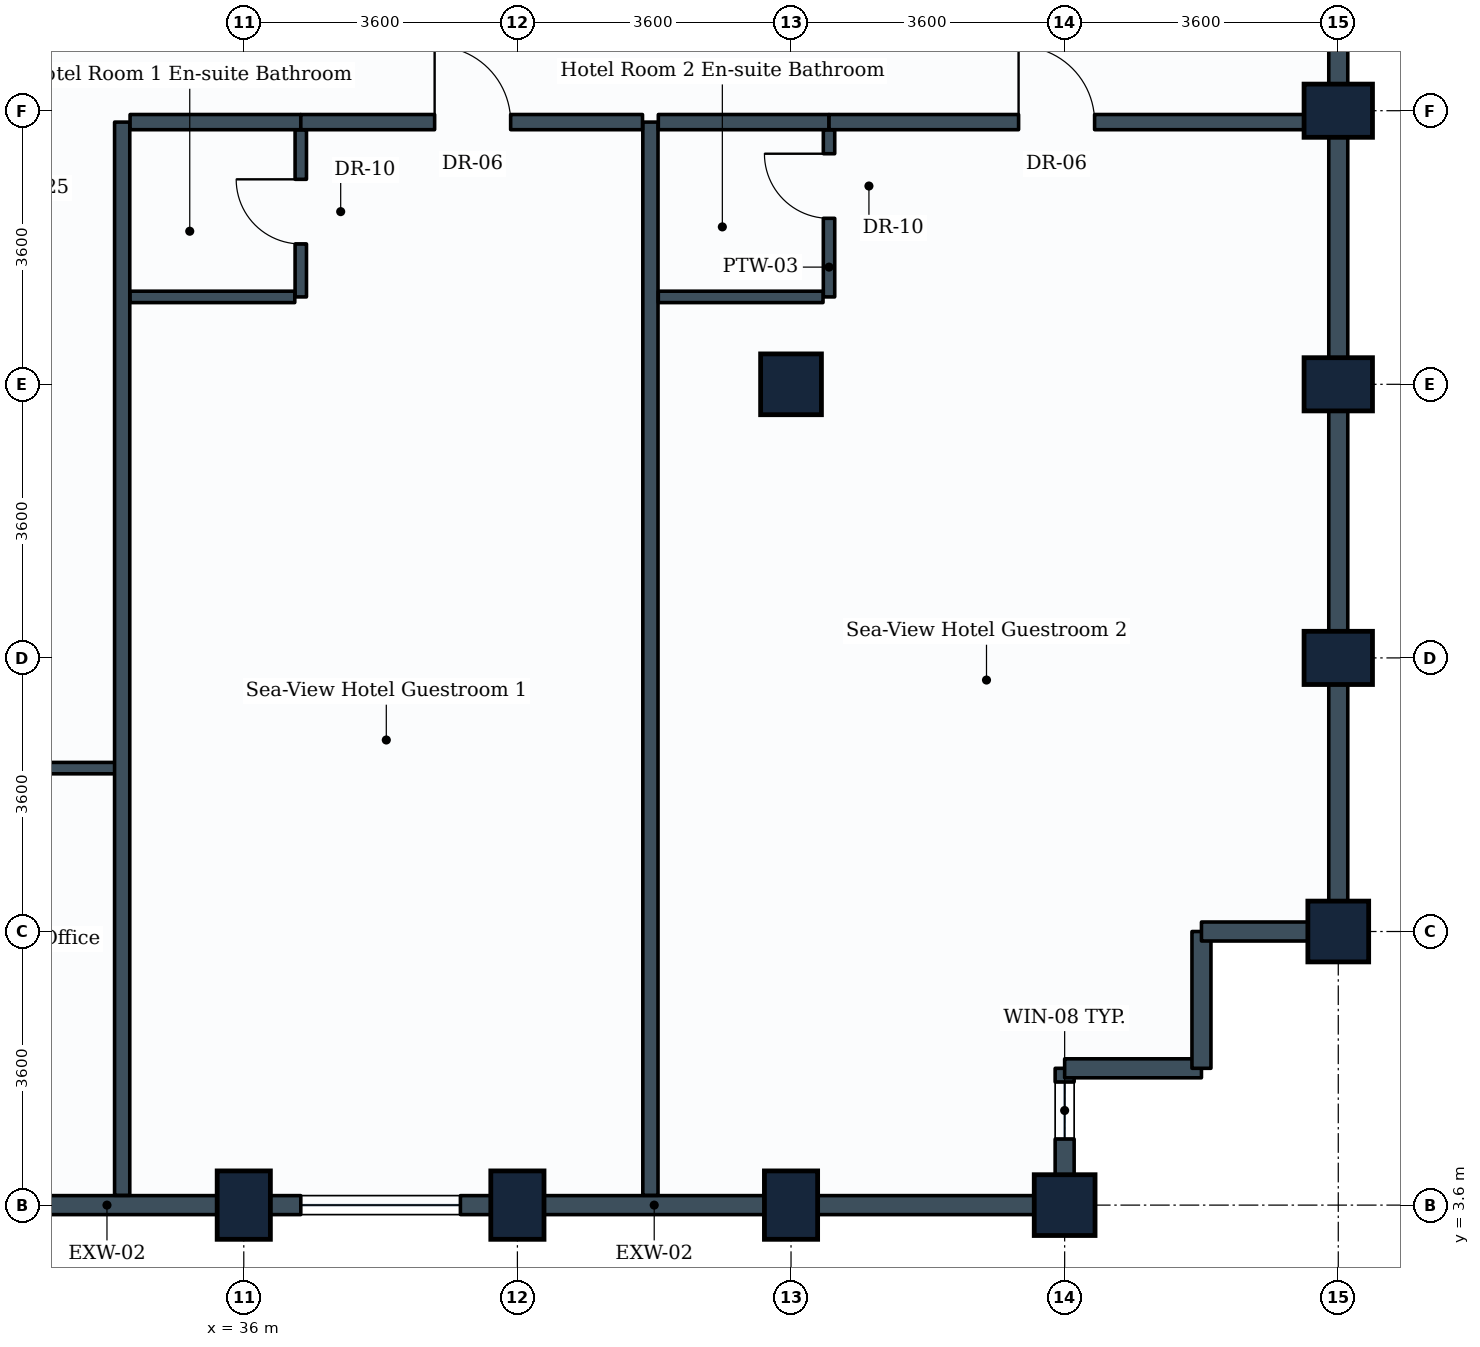
"""IFC4 building model, lengths in metres.
Left out: names, types, materials, properties, quantities, classifications, styles, units other than length and angle.
Written with IfcOpenShell. Run it as: python <this file> out.ifc"""

import sys

from ifc_helpers import new_model, si_unit, direction, frame, frame_2d, origin, origin_2d, place, context, subcontext, project, spatial, rectangle, extrude, element, fill, save


model = new_model("IFC4")
c1 = context("Model", 3, precision=1e-05, world=origin(), true_north=direction((0.0, 1.0)))
c2 = subcontext(c1, "Body", "Model", "MODEL_VIEW")
j1 = project(units=[si_unit("LENGTHUNIT", "METRE"), si_unit("PLANEANGLEUNIT", "RADIAN")], contexts=[c1])
p1 = place(None, origin())
s1 = spatial("IfcSite", under=j1, at=p1, CompositionType="ELEMENT")
p2 = place(p1, origin())
s2 = spatial("IfcBuilding", under=s1, at=p2, CompositionType="ELEMENT")
p3 = place(p2, frame((0.0, 0.0, 217.4)))
s3 = spatial("IfcBuildingStorey", under=s2, at=p3, CompositionType="ELEMENT", Elevation=217.4)
for number, where, z_axis, x_axis in (
    (1, (36.0, 3.6, 0.0), (0.0, 0.0, 1.0), (1.0, 0.0, 0.0)),
    (2, (39.6, 3.6, 0.0), (0.0, 0.0, 1.0), (1.0, 0.0, 0.0)),
    (3, (43.2, 3.6, 0.0), (0.0, 0.0, 1.0), (1.0, 0.0, 0.0)),
):
    element("IfcColumn", number, at=place(p3, frame(where, z_axis=z_axis, x_axis=x_axis)), inside=s3, PredefinedType="COLUMN", context=c2, shape_type="SweptSolid", body=[
        extrude(rectangle(XDim=0.7, YDim=0.9, at=origin_2d()), origin(), (0.0, 0.0, 1.0), 3.6),
    ])
for number, where, z_axis, x_axis in (
    (4, (43.2, 14.4, 0.0), (0.0, 0.0, 1.0), (1.0, 0.0, 0.0)),
    (5, (46.8, 3.6, 0.0), (0.0, 0.0, 1.0), (1.0, 0.0, 0.0)),
    (6, (50.4, 7.2, 0.0), (0.0, 0.0, 1.0), (1.0, 0.0, 0.0)),
):
    element("IfcColumn", number, at=place(p3, frame(where, z_axis=z_axis, x_axis=x_axis)), inside=s3, PredefinedType="COLUMN", context=c2, shape_type="SweptSolid", body=[
        extrude(rectangle(XDim=0.8, YDim=0.8, at=origin_2d()), origin(), (0.0, 0.0, 1.0), 3.6),
    ])
for number, where, z_axis, x_axis in (
    (7, (50.4, 10.8, 0.0), (0.0, 0.0, 1.0), (0.0, 1.0, 0.0)),
    (8, (50.4, 14.4, 0.0), (0.0, 0.0, 1.0), (0.0, 1.0, 0.0)),
    (9, (50.4, 18.0, 0.0), (0.0, 0.0, 1.0), (0.0, 1.0, 0.0)),
):
    element("IfcColumn", number, at=place(p3, frame(where, z_axis=z_axis, x_axis=x_axis)), inside=s3, PredefinedType="COLUMN", context=c2, shape_type="SweptSolid", body=[
        extrude(rectangle(XDim=0.7, YDim=0.9, at=origin_2d()), origin(), (0.0, 0.0, 1.0), 3.6),
    ])
p4 = place(p3, frame((36.0, 3.6, 0.0), z_axis=(0.0, 0.0, 1.0), x_axis=(-1.0, 0.0, 0.0)))
e10 = element("IfcWall", 10, at=p4, inside=s3, PredefinedType="STANDARD", context=c2, shape_type="SweptSolid", body=[
    extrude(rectangle(XDim=3.6, YDim=0.25, at=frame_2d((1.8, 0.0))), origin(), (0.0, 0.0, 1.0), 2.83),
])
p5 = place(p3, frame((39.6, 3.6, 0.0), z_axis=(0.0, 0.0, 1.0), x_axis=(-1.0, 0.0, 0.0)))
e11 = element("IfcWall", 11, at=p5, inside=s3, PredefinedType="STANDARD", context=c2, shape_type="SweptSolid", body=[
    extrude(rectangle(XDim=3.6, YDim=0.25, at=frame_2d((1.8, 0.0))), origin(), (0.0, 0.0, 1.0), 2.83),
])
p6 = place(p5, frame((0.75, 0.0, 0.85)))
e12 = element("IfcOpeningElement", 12, at=p6, cuts=e11, PredefinedType="OPENING", context=c2, shape_type="SweptSolid", body=[
    extrude(rectangle(XDim=2.1, YDim=1.35, at=frame_2d((1.05, 0.675))), frame((0.0, 0.135, 0.0), z_axis=(0.0, -1.0, 0.0), x_axis=(1.0, 0.0, 0.0)), (0.0, 0.0, 1.0), 0.27),
])
p7 = place(p3, frame((43.2, 3.6, 0.0), z_axis=(0.0, 0.0, 1.0), x_axis=(-1.0, 0.0, 0.0)))
e13 = element("IfcWall", 13, at=p7, inside=s3, PredefinedType="STANDARD", context=c2, shape_type="SweptSolid", body=[
    extrude(rectangle(XDim=3.6, YDim=0.25, at=frame_2d((1.8, 0.0))), origin(), (0.0, 0.0, 1.0), 2.23),
])
p8 = place(p3, frame((46.8, 3.6, 0.0), z_axis=(0.0, 0.0, 1.0), x_axis=(-1.0, 0.0, 0.0)))
e14 = element("IfcWall", 14, at=p8, inside=s3, PredefinedType="STANDARD", context=c2, shape_type="SweptSolid", body=[
    extrude(rectangle(XDim=3.6, YDim=0.25, at=frame_2d((1.8, 0.0))), origin(), (0.0, 0.0, 1.0), 2.23),
])
p9 = place(p3, frame((46.8, 5.4, 0.0), z_axis=(0.0, 0.0, 1.0), x_axis=(0.0, -1.0, 0.0)))
e15 = element("IfcWall", 15, at=p9, inside=s3, PredefinedType="STANDARD", context=c2, shape_type="SweptSolid", body=[
    extrude(rectangle(XDim=1.8, YDim=0.25, at=frame_2d((0.9, 0.0))), origin(), (0.0, 0.0, 1.0), 3.265),
])
p10 = place(p9, frame((0.18, 0.0, 0.85)))
e16 = element("IfcOpeningElement", 16, at=p10, cuts=e15, PredefinedType="OPENING", context=c2, shape_type="SweptSolid", body=[
    extrude(rectangle(XDim=0.75, YDim=1.05, at=frame_2d((0.375, 0.525))), frame((0.0, 0.135, 0.0), z_axis=(0.0, -1.0, 0.0), x_axis=(1.0, 0.0, 0.0)), (0.0, 0.0, 1.0), 0.27),
])
for number, where, z_axis, x_axis in (
    (17, (48.6, 5.4, 0.0), (0.0, 0.0, 1.0), (-1.0, 0.0, 0.0)),
    (18, (48.6, 7.2, 0.0), (0.0, 0.0, 1.0), (0.0, -1.0, 0.0)),
):
    element("IfcWall", number, at=place(p3, frame(where, z_axis=z_axis, x_axis=x_axis)), inside=s3, PredefinedType="STANDARD", context=c2, shape_type="SweptSolid", body=[
        extrude(rectangle(XDim=1.8, YDim=0.25, at=frame_2d((0.9, 0.0))), origin(), (0.0, 0.0, 1.0), 3.265),
    ])
p11 = place(p3, frame((50.4, 7.2, 0.0), z_axis=(0.0, 0.0, 1.0), x_axis=(-1.0, 0.0, 0.0)))
e19 = element("IfcWall", 19, at=p11, inside=s3, PredefinedType="STANDARD", context=c2, shape_type="SweptSolid", body=[
    extrude(rectangle(XDim=1.8, YDim=0.25, at=frame_2d((0.9, 0.0))), origin(), (0.0, 0.0, 1.0), 2.23),
])
p12 = place(p3, frame((50.4, 10.8, 0.0), z_axis=(0.0, 0.0, 1.0), x_axis=(0.0, -1.0, 0.0)))
e20 = element("IfcWall", 20, at=p12, inside=s3, PredefinedType="STANDARD", context=c2, shape_type="SweptSolid", body=[
    extrude(rectangle(XDim=3.6, YDim=0.25, at=frame_2d((1.8, 0.0))), origin(), (0.0, 0.0, 1.0), 2.23),
])
p13 = place(p3, frame((50.4, 14.4, 0.0), z_axis=(0.0, 0.0, 1.0), x_axis=(0.0, -1.0, 0.0)))
e21 = element("IfcWall", 21, at=p13, inside=s3, PredefinedType="STANDARD", context=c2, shape_type="SweptSolid", body=[
    extrude(rectangle(XDim=3.6, YDim=0.25, at=frame_2d((1.8, 0.0))), origin(), (0.0, 0.0, 1.0), 2.23),
])
for number, where, z_axis, x_axis in (
    (22, (50.4, 18.0, 0.0), (0.0, 0.0, 1.0), (0.0, -1.0, 0.0)),
    (23, (50.4, 21.6, 0.0), (0.0, 0.0, 1.0), (0.0, -1.0, 0.0)),
):
    element("IfcWall", number, at=place(p3, frame(where, z_axis=z_axis, x_axis=x_axis)), inside=s3, PredefinedType="STANDARD", context=c2, shape_type="SweptSolid", body=[
        extrude(rectangle(XDim=3.6, YDim=0.25, at=frame_2d((1.8, 0.0))), origin(), (0.0, 0.0, 1.0), 2.23),
    ])
p14 = place(p3, frame((28.879, 9.35, 0.0), z_axis=(0.0, 0.0, 1.0), x_axis=(1.0, 0.0, 0.0)))
e24 = element("IfcWall", 24, at=p14, inside=s3, PredefinedType="PARTITIONING", context=c2, shape_type="SweptSolid", body=[
    extrude(rectangle(XDim=5.521, YDim=0.15, at=frame_2d((2.76, 0.0))), origin(), (0.0, 0.0, 1.0), 3.265),
])
p15 = place(p14, frame((0.36, 0.0, 0.0)))
e25 = element("IfcOpeningElement", 25, at=p15, cuts=e24, PredefinedType="OPENING", context=c2, shape_type="SweptSolid", body=[
    extrude(rectangle(XDim=1.0, YDim=2.1, at=frame_2d((0.5, 1.05))), frame((0.0, 0.085, 0.0), z_axis=(0.0, -1.0, 0.0), x_axis=(1.0, 0.0, 0.0)), (0.0, 0.0, 1.0), 0.17),
])
for number, where, z_axis, x_axis in (
    (26, (34.4, 3.729, 0.0), (0.0, 0.0, 1.0), (0.0, 1.0, 0.0)),
    (27, (41.35, 3.729, 0.0), (0.0, 0.0, 1.0), (0.0, 1.0, 0.0)),
):
    element("IfcWall", number, at=place(p3, frame(where, z_axis=z_axis, x_axis=x_axis)), inside=s3, PredefinedType="PARTITIONING", context=c2, shape_type="SweptSolid", body=[
        extrude(rectangle(XDim=14.121, YDim=0.2, at=frame_2d((7.061, 0.0))), origin(), (0.0, 0.0, 1.0), 2.23),
    ])
p16 = place(p3, frame((34.504, 17.85, 0.0), z_axis=(0.0, 0.0, 1.0), x_axis=(1.0, 0.0, 0.0)))
e28 = element("IfcWall", 28, at=p16, inside=s3, PredefinedType="PARTITIONING", context=c2, shape_type="SweptSolid", body=[
    extrude(rectangle(XDim=2.246, YDim=0.2, at=frame_2d((1.123, 0.0))), origin(), (0.0, 0.0, 1.0), 2.96),
])
p17 = place(p3, frame((36.75, 17.85, 0.0), z_axis=(0.0, 0.0, 1.0), x_axis=(1.0, 0.0, 0.0)))
e29 = element("IfcWall", 29, at=p17, inside=s3, PredefinedType="PARTITIONING", context=c2, shape_type="SweptSolid", body=[
    extrude(rectangle(XDim=4.496, YDim=0.2, at=frame_2d((2.248, 0.0))), origin(), (0.0, 0.0, 1.0), 3.265),
])
p18 = place(p17, frame((1.761, 0.0, 0.0)))
e30 = element("IfcOpeningElement", 30, at=p18, cuts=e29, PredefinedType="OPENING", context=c2, shape_type="SweptSolid", body=[
    extrude(rectangle(XDim=1.0, YDim=2.1, at=frame_2d((0.5, 1.05))), frame((0.0, 0.11, 0.0), z_axis=(0.0, -1.0, 0.0), x_axis=(1.0, 0.0, 0.0)), (0.0, 0.0, 1.0), 0.22),
])
p19 = place(p3, frame((36.75, 15.55, 0.0), z_axis=(0.0, 0.0, 1.0), x_axis=(0.0, 1.0, 0.0)))
e31 = element("IfcWall", 31, at=p19, inside=s3, PredefinedType="PARTITIONING", context=c2, shape_type="SweptSolid", body=[
    extrude(rectangle(XDim=2.196, YDim=0.15, at=frame_2d((1.098, 0.0))), origin(), (0.0, 0.0, 1.0), 3.265),
])
p20 = place(p19, frame((0.697, 0.0, 0.0)))
e32 = element("IfcOpeningElement", 32, at=p20, cuts=e31, PredefinedType="OPENING", context=c2, shape_type="SweptSolid", body=[
    extrude(rectangle(XDim=0.85, YDim=2.1, at=frame_2d((0.425, 1.05))), frame((0.0, 0.085, 0.0), z_axis=(0.0, -1.0, 0.0), x_axis=(1.0, 0.0, 0.0)), (0.0, 0.0, 1.0), 0.17),
])
p21 = place(p3, frame((34.504, 15.55, 0.0), z_axis=(0.0, 0.0, 1.0), x_axis=(1.0, 0.0, 0.0)))
e33 = element("IfcWall", 33, at=p21, inside=s3, PredefinedType="PARTITIONING", context=c2, shape_type="SweptSolid", body=[
    extrude(rectangle(XDim=2.167, YDim=0.15, at=frame_2d((1.083, 0.0))), origin(), (0.0, 0.0, 1.0), 2.96),
])
p22 = place(p3, frame((41.454, 17.85, 0.0), z_axis=(0.0, 0.0, 1.0), x_axis=(1.0, 0.0, 0.0)))
e34 = element("IfcWall", 34, at=p22, inside=s3, PredefinedType="PARTITIONING", context=c2, shape_type="SweptSolid", body=[
    extrude(rectangle(XDim=2.246, YDim=0.2, at=frame_2d((1.123, 0.0))), origin(), (0.0, 0.0, 1.0), 2.23),
])
p23 = place(p3, frame((43.7, 17.85, 0.0), z_axis=(0.0, 0.0, 1.0), x_axis=(1.0, 0.0, 0.0)))
e35 = element("IfcWall", 35, at=p23, inside=s3, PredefinedType="PARTITIONING", context=c2, shape_type="SweptSolid", body=[
    extrude(rectangle(XDim=6.571, YDim=0.2, at=frame_2d((3.286, 0.0))), origin(), (0.0, 0.0, 1.0), 2.23),
])
p24 = place(p23, frame((2.494, 0.0, 0.0)))
e36 = element("IfcOpeningElement", 36, at=p24, cuts=e35, PredefinedType="OPENING", context=c2, shape_type="SweptSolid", body=[
    extrude(rectangle(XDim=1.0, YDim=2.1, at=frame_2d((0.5, 1.05))), frame((0.0, 0.11, 0.0), z_axis=(0.0, -1.0, 0.0), x_axis=(1.0, 0.0, 0.0)), (0.0, 0.0, 1.0), 0.22),
])
p25 = place(p3, frame((43.7, 15.55, 0.0), z_axis=(0.0, 0.0, 1.0), x_axis=(0.0, 1.0, 0.0)))
e37 = element("IfcWall", 37, at=p25, inside=s3, PredefinedType="PARTITIONING", context=c2, shape_type="SweptSolid", body=[
    extrude(rectangle(XDim=2.196, YDim=0.15, at=frame_2d((1.098, 0.0))), origin(), (0.0, 0.0, 1.0), 2.23),
])
p26 = place(p25, frame((1.034, 0.0, 0.0)))
e38 = element("IfcOpeningElement", 38, at=p26, cuts=e37, PredefinedType="OPENING", context=c2, shape_type="SweptSolid", body=[
    extrude(rectangle(XDim=0.85, YDim=2.1, at=frame_2d((0.425, 1.05))), frame((0.0, 0.085, 0.0), z_axis=(0.0, -1.0, 0.0), x_axis=(1.0, 0.0, 0.0)), (0.0, 0.0, 1.0), 0.17),
])
p27 = place(p3, frame((41.454, 15.55, 0.0), z_axis=(0.0, 0.0, 1.0), x_axis=(1.0, 0.0, 0.0)))
e39 = element("IfcWall", 39, at=p27, inside=s3, PredefinedType="PARTITIONING", context=c2, shape_type="SweptSolid", body=[
    extrude(rectangle(XDim=2.167, YDim=0.15, at=frame_2d((1.083, 0.0))), origin(), (0.0, 0.0, 1.0), 2.23),
])
p28 = place(p6, origin())
e40 = element("IfcWindow", 40, at=p28, inside=s3, PartitioningType="SINGLE_PANEL", PredefinedType="WINDOW", context=c2, shape_type="SweptSolid", body=[
    extrude(rectangle(XDim=2.1, YDim=1.35, at=frame_2d((1.05, 0.675))), frame((0.0, 0.03, 0.0), z_axis=(0.0, -1.0, 0.0), x_axis=(1.0, 0.0, 0.0)), (0.0, 0.0, 1.0), 0.06),
])
fill(e12, e40)
p29 = place(p18, origin())
e41 = element("IfcDoor", 41, at=p29, inside=s3, OperationType="SINGLE_SWING_LEFT", PredefinedType="DOOR", context=c2, shape_type="SweptSolid", body=[
    extrude(rectangle(XDim=1.0, YDim=2.1, at=frame_2d((0.5, 1.05))), frame((0.0, 0.025, 0.0), z_axis=(0.0, -1.0, 0.0), x_axis=(1.0, 0.0, 0.0)), (0.0, 0.0, 1.0), 0.05),
])
fill(e30, e41)
p30 = place(p20, origin())
e42 = element("IfcDoor", 42, at=p30, inside=s3, OperationType="SINGLE_SWING_RIGHT", PredefinedType="DOOR", context=c2, shape_type="SweptSolid", body=[
    extrude(rectangle(XDim=0.85, YDim=2.1, at=frame_2d((0.425, 1.05))), frame((0.0, 0.025, 0.0), z_axis=(0.0, -1.0, 0.0), x_axis=(1.0, 0.0, 0.0)), (0.0, 0.0, 1.0), 0.05),
])
fill(e32, e42)
p31 = place(p24, origin())
e43 = element("IfcDoor", 43, at=p31, inside=s3, OperationType="SINGLE_SWING_LEFT", PredefinedType="DOOR", context=c2, shape_type="SweptSolid", body=[
    extrude(rectangle(XDim=1.0, YDim=2.1, at=frame_2d((0.5, 1.05))), frame((0.0, 0.025, 0.0), z_axis=(0.0, -1.0, 0.0), x_axis=(1.0, 0.0, 0.0)), (0.0, 0.0, 1.0), 0.05),
])
fill(e36, e43)
p32 = place(p26, origin())
e44 = element("IfcDoor", 44, at=p32, inside=s3, OperationType="SINGLE_SWING_RIGHT", PredefinedType="DOOR", context=c2, shape_type="SweptSolid", body=[
    extrude(rectangle(XDim=0.85, YDim=2.1, at=frame_2d((0.425, 1.05))), frame((0.0, 0.025, 0.0), z_axis=(0.0, -1.0, 0.0), x_axis=(1.0, 0.0, 0.0)), (0.0, 0.0, 1.0), 0.05),
])
fill(e38, e44)
p33 = place(p10, origin())
e45 = element("IfcWindow", 45, at=p33, inside=s3, PartitioningType="SINGLE_PANEL", PredefinedType="WINDOW", context=c2, shape_type="SweptSolid", body=[
    extrude(rectangle(XDim=0.75, YDim=1.05, at=frame_2d((0.375, 0.525))), frame((0.0, 0.03, 0.0), z_axis=(0.0, -1.0, 0.0), x_axis=(1.0, 0.0, 0.0)), (0.0, 0.0, 1.0), 0.06),
])
fill(e16, e45)
save(model, sys.argv[1])
